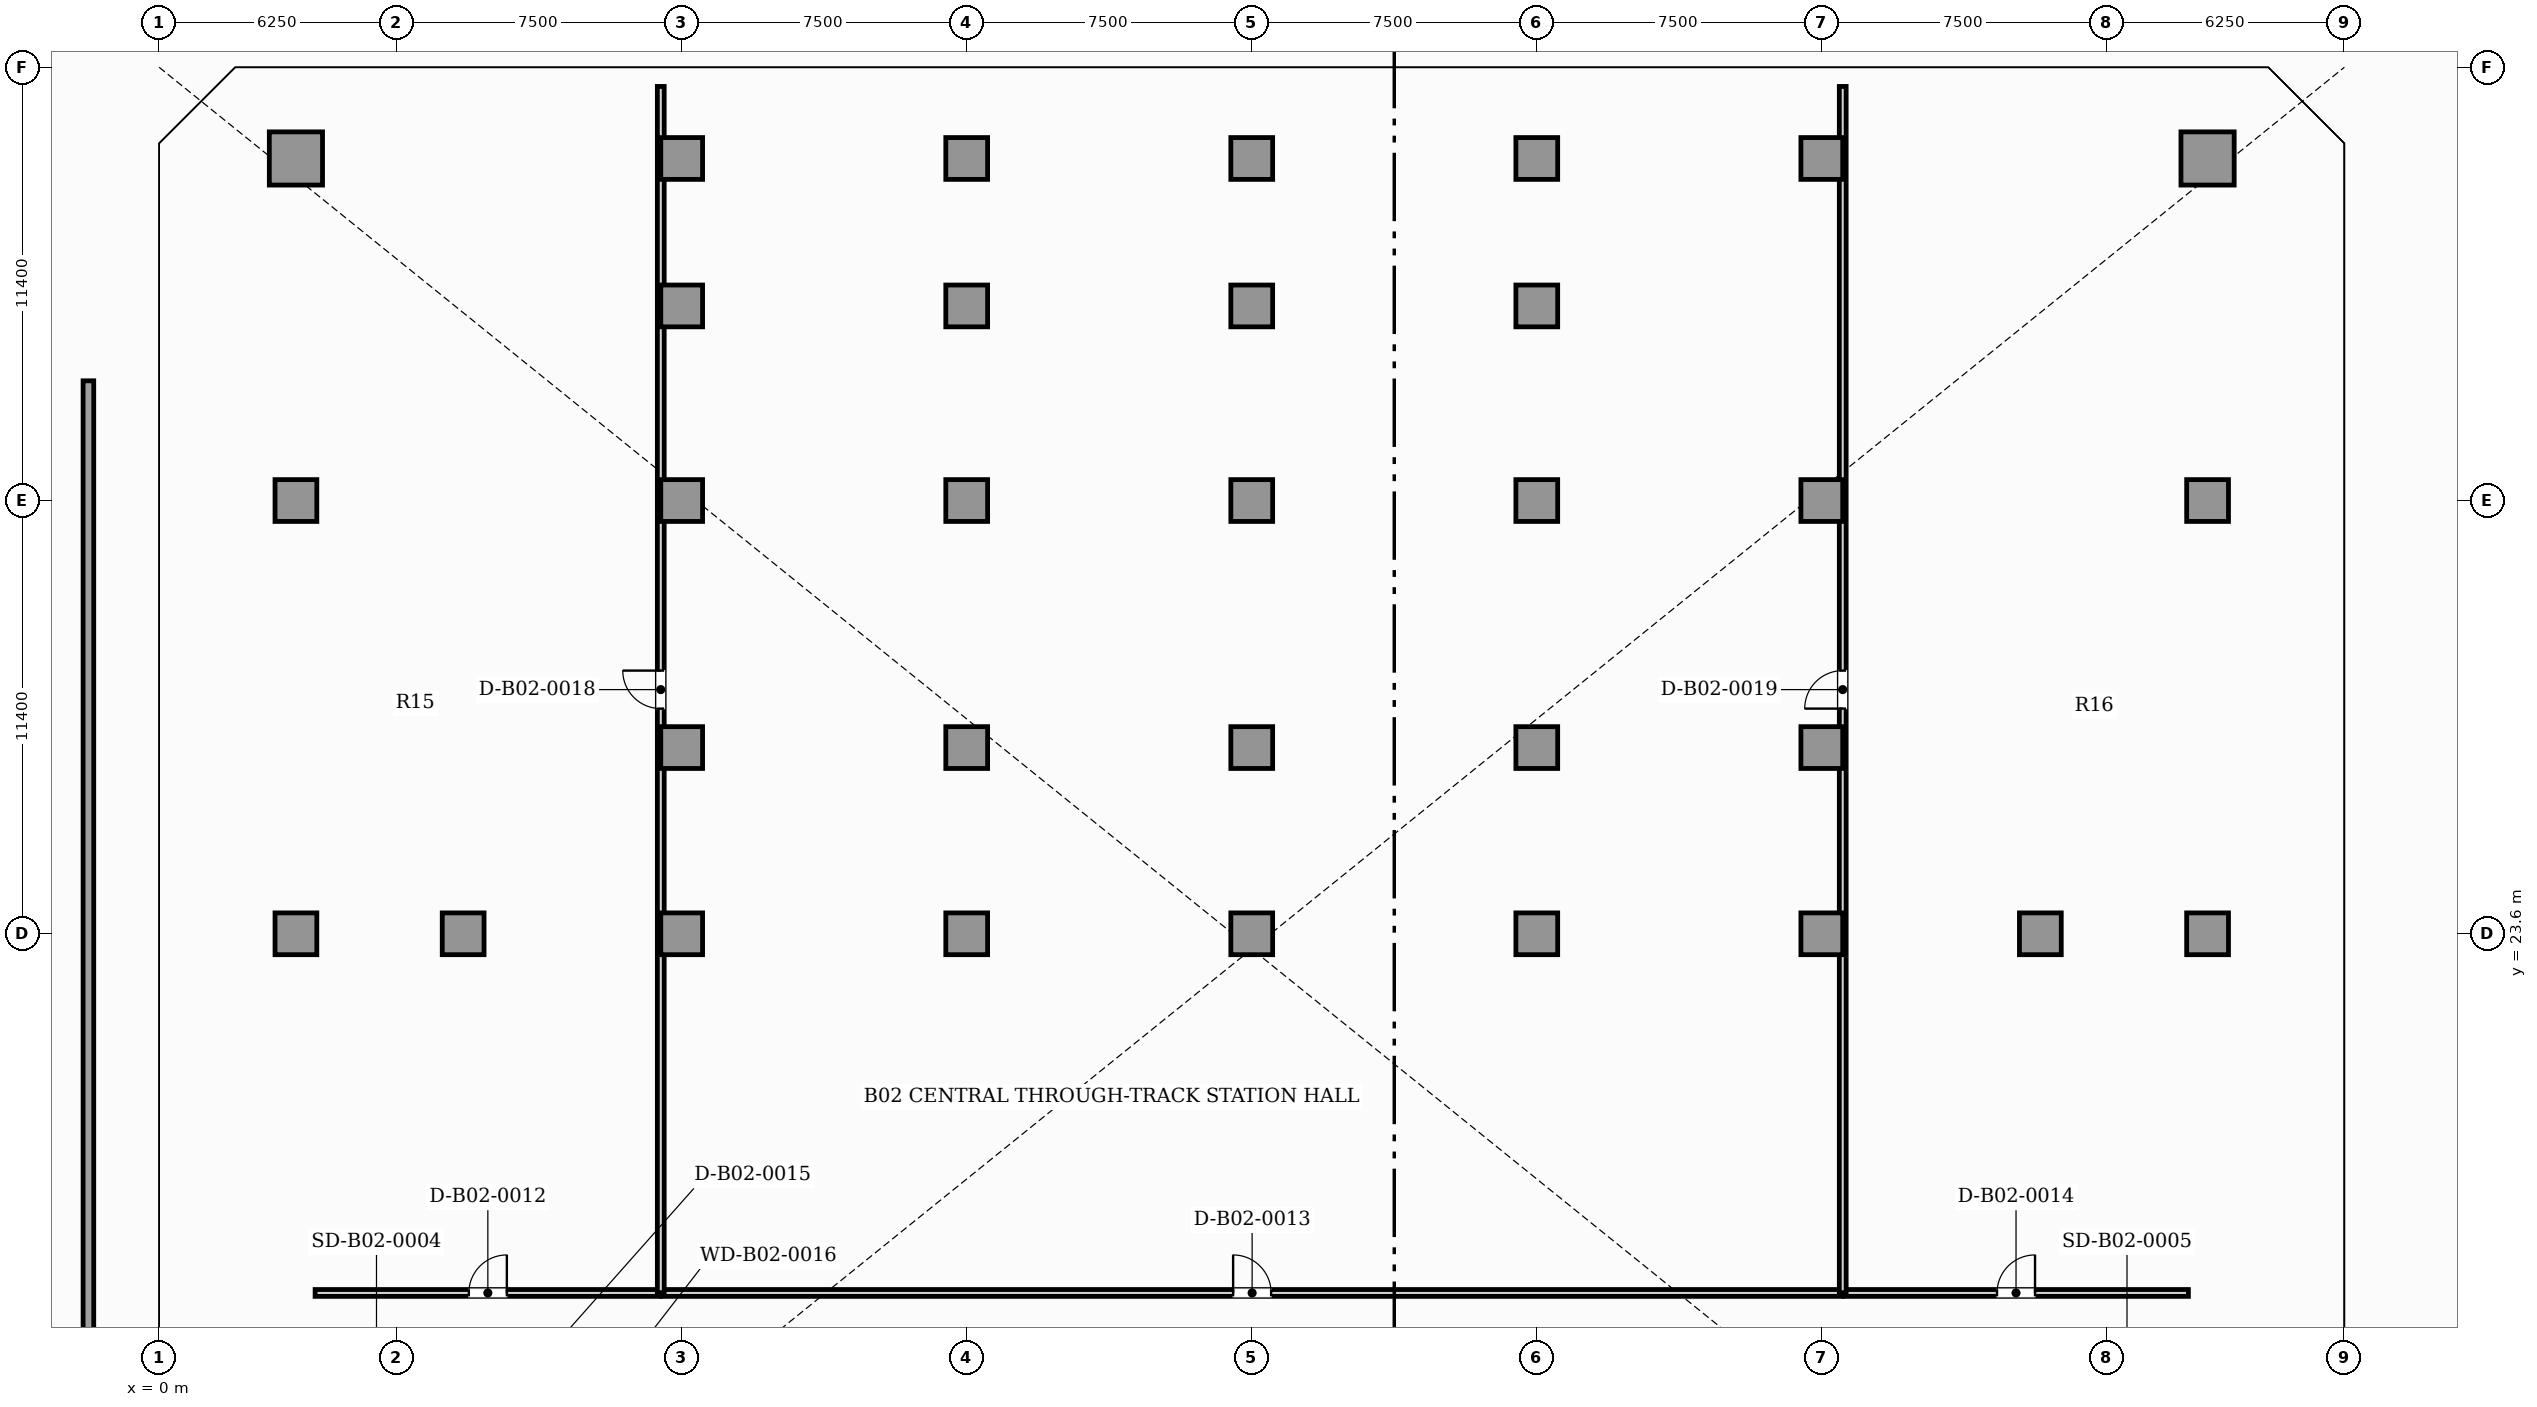
"""IFC4 building model, lengths in metres.
Left out: names, types, materials, properties, quantities, classifications, styles, units other than length and angle.
Written with IfcOpenShell. Run it as: python <this file> out.ifc"""

import sys

from ifc_helpers import new_model, si_unit, direction, frame, frame_2d, origin, origin_2d, place, context, subcontext, project, spatial, rectangle, hollow_rectangle, extrude, element, fill, save


model = new_model("IFC4")
c1 = context("Model", 3, precision=1e-05, world=origin(), true_north=direction((0.0, 1.0)))
c2 = subcontext(c1, "Body", "Model", "MODEL_VIEW")
j1 = project(units=[si_unit("LENGTHUNIT", "METRE"), si_unit("PLANEANGLEUNIT", "RADIAN")], contexts=[c1])
p1 = place(None, origin())
s1 = spatial("IfcSite", under=j1, at=p1, CompositionType="ELEMENT")
p2 = place(p1, origin())
s2 = spatial("IfcBuilding", under=s1, at=p2, CompositionType="ELEMENT")
p3 = place(p2, frame((0.0, 0.0, -10.8)))
s3 = spatial("IfcBuildingStorey", under=s2, at=p3, CompositionType="ELEMENT", Elevation=-10.8)
p4 = place(p3, frame((-1.86, 3.88, 0.0), z_axis=(0.0, 0.0, 1.0), x_axis=(0.0, 1.0, 0.0)))
e1 = element("IfcWall", 1, at=p4, inside=s3, PredefinedType="SHEAR", context=c2, shape_type="SweptSolid", body=[
    extrude(rectangle(XDim=34.27, YDim=0.28, at=frame_2d((17.135, 0.0))), origin(), (0.0, 0.0, 1.0), 5.05),
])
for number, where, z_axis, x_axis in (
    (2, (53.9, 44.0, 0.0), (0.0, 0.0, 1.0), (1.0, 0.0, 0.0)),
    (3, (3.6, 44.0, 0.0), (0.0, 0.0, 1.0), (1.0, 0.0, 0.0)),
):
    element("IfcColumn", number, at=place(p3, frame(where, z_axis=z_axis, x_axis=x_axis)), inside=s3, PredefinedType="USERDEFINED", context=c2, shape_type="SweptSolid", body=[
        extrude(hollow_rectangle(XDim=1.4, YDim=1.4, WallThickness=0.08, at=origin_2d()), origin(), (0.0, 0.0, 1.0), 5.4),
    ])
for number, where, z_axis, x_axis in (
    (4, (3.6, 23.6, 0.0), (0.0, 0.0, 1.0), (1.0, 0.0, 0.0)),
    (5, (3.6, 35.0, 0.0), (0.0, 0.0, 1.0), (1.0, 0.0, 0.0)),
    (6, (13.75, 23.6, 0.0), (0.0, 0.0, 1.0), (1.0, 0.0, 0.0)),
    (7, (13.75, 35.0, 0.0), (0.0, 0.0, 1.0), (1.0, 0.0, 0.0)),
    (8, (13.75, 44.0, 0.0), (0.0, 0.0, 1.0), (1.0, 0.0, 0.0)),
    (9, (28.75, 23.6, 0.0), (0.0, 0.0, 1.0), (1.0, 0.0, 0.0)),
    (10, (28.75, 35.0, 0.0), (0.0, 0.0, 1.0), (1.0, 0.0, 0.0)),
    (11, (28.75, 44.0, 0.0), (0.0, 0.0, 1.0), (1.0, 0.0, 0.0)),
    (12, (43.75, 23.6, 0.0), (0.0, 0.0, 1.0), (1.0, 0.0, 0.0)),
    (13, (43.75, 35.0, 0.0), (0.0, 0.0, 1.0), (1.0, 0.0, 0.0)),
    (14, (43.75, 44.0, 0.0), (0.0, 0.0, 1.0), (1.0, 0.0, 0.0)),
    (15, (53.9, 23.6, 0.0), (0.0, 0.0, 1.0), (1.0, 0.0, 0.0)),
    (16, (53.9, 35.0, 0.0), (0.0, 0.0, 1.0), (1.0, 0.0, 0.0)),
    (17, (8.0, 23.6, 0.0), (0.0, 0.0, 1.0), (1.0, 0.0, 0.0)),
    (18, (21.25, 23.6, 0.0), (0.0, 0.0, 1.0), (1.0, 0.0, 0.0)),
    (19, (36.25, 23.6, 0.0), (0.0, 0.0, 1.0), (1.0, 0.0, 0.0)),
    (20, (49.5, 23.6, 0.0), (0.0, 0.0, 1.0), (1.0, 0.0, 0.0)),
    (21, (13.75, 28.5, 0.0), (0.0, 0.0, 1.0), (1.0, 0.0, 0.0)),
    (22, (21.25, 28.5, 0.0), (0.0, 0.0, 1.0), (1.0, 0.0, 0.0)),
    (23, (28.75, 28.5, 0.0), (0.0, 0.0, 1.0), (1.0, 0.0, 0.0)),
    (24, (36.25, 28.5, 0.0), (0.0, 0.0, 1.0), (1.0, 0.0, 0.0)),
    (25, (43.75, 28.5, 0.0), (0.0, 0.0, 1.0), (1.0, 0.0, 0.0)),
    (26, (21.25, 35.0, 0.0), (0.0, 0.0, 1.0), (1.0, 0.0, 0.0)),
    (27, (36.25, 35.0, 0.0), (0.0, 0.0, 1.0), (1.0, 0.0, 0.0)),
    (28, (13.75, 40.12, 0.0), (0.0, 0.0, 1.0), (1.0, 0.0, 0.0)),
    (29, (21.25, 40.12, 0.0), (0.0, 0.0, 1.0), (1.0, 0.0, 0.0)),
    (30, (28.75, 40.12, 0.0), (0.0, 0.0, 1.0), (1.0, 0.0, 0.0)),
    (31, (36.25, 40.12, 0.0), (0.0, 0.0, 1.0), (1.0, 0.0, 0.0)),
    (32, (21.25, 44.0, 0.0), (0.0, 0.0, 1.0), (1.0, 0.0, 0.0)),
    (33, (36.25, 44.0, 0.0), (0.0, 0.0, 1.0), (1.0, 0.0, 0.0)),
):
    element("IfcColumn", number, at=place(p3, frame(where, z_axis=z_axis, x_axis=x_axis)), inside=s3, PredefinedType="COLUMN", context=c2, shape_type="SweptSolid", body=[
        extrude(rectangle(XDim=1.1, YDim=1.1, at=origin_2d()), origin(), (0.0, 0.0, 1.0), 5.4),
    ])
p5 = place(p3, frame((4.105, 14.15, 0.0), z_axis=(0.0, 0.0, 1.0), x_axis=(1.0, 0.0, 0.0)))
e34 = element("IfcWall", 34, at=p5, inside=s3, PredefinedType="PARTITIONING", context=c2, shape_type="SweptSolid", body=[
    extrude(rectangle(XDim=9.09, YDim=0.18, at=frame_2d((4.545, 0.0))), origin(), (0.0, 0.0, 1.0), 5.05),
])
p6 = place(p5, frame((4.045, 0.0, 0.0)))
e35 = element("IfcOpeningElement", 35, at=p6, cuts=e34, PredefinedType="OPENING", context=c2, shape_type="SweptSolid", body=[
    extrude(rectangle(XDim=1.0, YDim=2.15, at=frame_2d((0.5, 1.075))), frame((0.0, 0.1, 0.0), z_axis=(0.0, -1.0, 0.0), x_axis=(1.0, 0.0, 0.0)), (0.0, 0.0, 1.0), 0.2),
])
p7 = place(p3, frame((13.225, 14.15, 0.0), z_axis=(0.0, 0.0, 1.0), x_axis=(1.0, 0.0, 0.0)))
e36 = element("IfcWall", 36, at=p7, inside=s3, PredefinedType="PARTITIONING", context=c2, shape_type="SweptSolid", body=[
    extrude(rectangle(XDim=31.07, YDim=0.18, at=frame_2d((15.535, 0.0))), origin(), (0.0, 0.0, 1.0), 5.05),
])
p8 = place(p7, frame((15.035, 0.0, 0.0)))
e37 = element("IfcOpeningElement", 37, at=p8, cuts=e36, PredefinedType="OPENING", context=c2, shape_type="SweptSolid", body=[
    extrude(rectangle(XDim=1.0, YDim=2.15, at=frame_2d((0.5, 1.075))), frame((0.0, 0.1, 0.0), z_axis=(0.0, -1.0, 0.0), x_axis=(1.0, 0.0, 0.0)), (0.0, 0.0, 1.0), 0.2),
])
p9 = place(p3, frame((44.325, 14.15, 0.0), z_axis=(0.0, 0.0, 1.0), x_axis=(1.0, 0.0, 0.0)))
e38 = element("IfcWall", 38, at=p9, inside=s3, PredefinedType="PARTITIONING", context=c2, shape_type="SweptSolid", body=[
    extrude(rectangle(XDim=9.07, YDim=0.18, at=frame_2d((4.535, 0.0))), origin(), (0.0, 0.0, 1.0), 5.05),
])
p10 = place(p9, frame((4.035, 0.0, 0.0)))
e39 = element("IfcOpeningElement", 39, at=p10, cuts=e38, PredefinedType="OPENING", context=c2, shape_type="SweptSolid", body=[
    extrude(rectangle(XDim=1.0, YDim=2.15, at=frame_2d((0.5, 1.075))), frame((0.0, 0.1, 0.0), z_axis=(0.0, -1.0, 0.0), x_axis=(1.0, 0.0, 0.0)), (0.0, 0.0, 1.0), 0.2),
])
p11 = place(p3, frame((13.2, 14.155, 0.0), z_axis=(0.0, 0.0, 1.0), x_axis=(0.0, 1.0, 0.0)))
e40 = element("IfcWall", 40, at=p11, inside=s3, PredefinedType="PARTITIONING", context=c2, shape_type="SweptSolid", body=[
    extrude(rectangle(XDim=31.74, YDim=0.18, at=frame_2d((15.87, 0.0))), origin(), (0.0, 0.0, 1.0), 5.05),
])
p12 = place(p11, frame((15.37, 0.0, 0.0)))
e41 = element("IfcOpeningElement", 41, at=p12, cuts=e40, PredefinedType="OPENING", context=c2, shape_type="SweptSolid", body=[
    extrude(rectangle(XDim=1.0, YDim=2.15, at=frame_2d((0.5, 1.075))), frame((0.0, 0.1, 0.0), z_axis=(0.0, -1.0, 0.0), x_axis=(1.0, 0.0, 0.0)), (0.0, 0.0, 1.0), 0.2),
])
p13 = place(p3, frame((44.3, 14.155, 0.0), z_axis=(0.0, 0.0, 1.0), x_axis=(0.0, 1.0, 0.0)))
e42 = element("IfcWall", 42, at=p13, inside=s3, PredefinedType="PARTITIONING", context=c2, shape_type="SweptSolid", body=[
    extrude(rectangle(XDim=31.74, YDim=0.18, at=frame_2d((15.87, 0.0))), origin(), (0.0, 0.0, 1.0), 5.05),
])
p14 = place(p13, frame((15.37, 0.0, 0.0)))
e43 = element("IfcOpeningElement", 43, at=p14, cuts=e42, PredefinedType="OPENING", context=c2, shape_type="SweptSolid", body=[
    extrude(rectangle(XDim=1.0, YDim=2.15, at=frame_2d((0.5, 1.075))), frame((0.0, 0.1, 0.0), z_axis=(0.0, -1.0, 0.0), x_axis=(1.0, 0.0, 0.0)), (0.0, 0.0, 1.0), 0.2),
])
p15 = place(p6, origin())
e44 = element("IfcDoor", 44, at=p15, inside=s3, OperationType="SINGLE_SWING_RIGHT", PredefinedType="DOOR", context=c2, shape_type="SweptSolid", body=[
    extrude(rectangle(XDim=1.0, YDim=2.15, at=frame_2d((0.5, 1.075))), frame((0.0, 0.025, 0.0), z_axis=(0.0, -1.0, 0.0), x_axis=(1.0, 0.0, 0.0)), (0.0, 0.0, 1.0), 0.05),
])
fill(e35, e44)
p16 = place(p8, origin())
e45 = element("IfcDoor", 45, at=p16, inside=s3, OperationType="SINGLE_SWING_LEFT", PredefinedType="DOOR", context=c2, shape_type="SweptSolid", body=[
    extrude(rectangle(XDim=1.0, YDim=2.15, at=frame_2d((0.5, 1.075))), frame((0.0, 0.025, 0.0), z_axis=(0.0, -1.0, 0.0), x_axis=(1.0, 0.0, 0.0)), (0.0, 0.0, 1.0), 0.05),
])
fill(e37, e45)
p17 = place(p10, origin())
e46 = element("IfcDoor", 46, at=p17, inside=s3, OperationType="SINGLE_SWING_RIGHT", PredefinedType="DOOR", context=c2, shape_type="SweptSolid", body=[
    extrude(rectangle(XDim=1.0, YDim=2.15, at=frame_2d((0.5, 1.075))), frame((0.0, 0.025, 0.0), z_axis=(0.0, -1.0, 0.0), x_axis=(1.0, 0.0, 0.0)), (0.0, 0.0, 1.0), 0.05),
])
fill(e39, e46)
p18 = place(p12, origin())
e47 = element("IfcDoor", 47, at=p18, inside=s3, OperationType="SINGLE_SWING_RIGHT", PredefinedType="DOOR", context=c2, shape_type="SweptSolid", body=[
    extrude(rectangle(XDim=1.0, YDim=2.15, at=frame_2d((0.5, 1.075))), frame((0.0, 0.025, 0.0), z_axis=(0.0, -1.0, 0.0), x_axis=(1.0, 0.0, 0.0)), (0.0, 0.0, 1.0), 0.05),
])
fill(e41, e47)
p19 = place(p14, origin())
e48 = element("IfcDoor", 48, at=p19, inside=s3, OperationType="SINGLE_SWING_LEFT", PredefinedType="DOOR", context=c2, shape_type="SweptSolid", body=[
    extrude(rectangle(XDim=1.0, YDim=2.15, at=frame_2d((0.5, 1.075))), frame((0.0, 0.025, 0.0), z_axis=(0.0, -1.0, 0.0), x_axis=(1.0, 0.0, 0.0)), (0.0, 0.0, 1.0), 0.05),
])
fill(e43, e48)
save(model, sys.argv[1])
